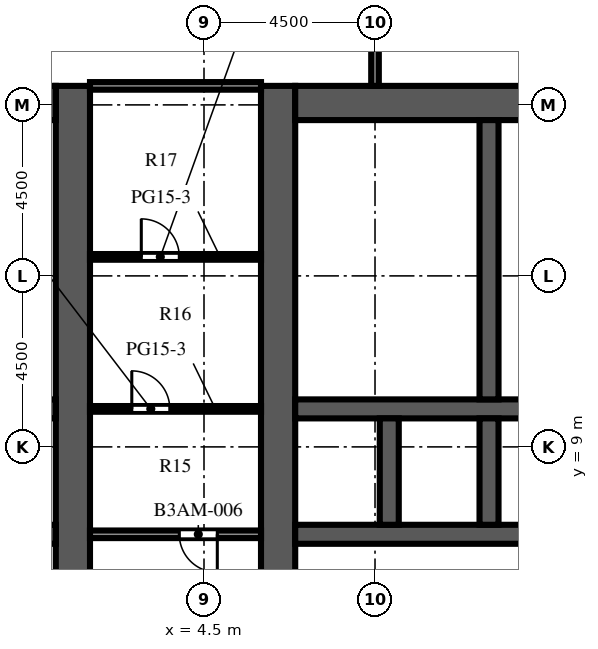
"""IFC4 building model, lengths in metres.
Left out: names, types, materials, properties, quantities, classifications, styles, units other than length and angle.
Written with IfcOpenShell. Run it as: python <this file> out.ifc"""

import sys

from ifc_helpers import new_model, si_unit, direction, frame, frame_2d, origin, place, context, subcontext, project, spatial, rectangle, extrude, element, fill, save


model = new_model("IFC4")
c1 = context("Model", 3, precision=1e-05, world=origin(), true_north=direction((0.0, 1.0)))
c2 = subcontext(c1, "Body", "Model", "MODEL_VIEW")
j1 = project(units=[si_unit("LENGTHUNIT", "METRE"), si_unit("PLANEANGLEUNIT", "RADIAN")], contexts=[c1])
p1 = place(None, origin())
s1 = spatial("IfcSite", under=j1, at=p1, CompositionType="ELEMENT")
p2 = place(p1, origin())
s2 = spatial("IfcBuilding", under=s1, at=p2, CompositionType="ELEMENT")
p3 = place(p2, frame((0.0, 0.0, 110.7)))
s3 = spatial("IfcBuildingStorey", under=s2, at=p3, CompositionType="ELEMENT", Elevation=110.7)
p4 = place(p3, frame((1.05, -9.0, 0.0), z_axis=(0.0, 0.0, 1.0), x_axis=(0.0, 1.0, 0.0)))
e1 = element("IfcWall", 1, at=p4, inside=s3, PredefinedType="SHEAR", context=c2, shape_type="SweptSolid", body=[
    extrude(rectangle(XDim=27.5, YDim=0.9, at=frame_2d((13.75, 0.0))), origin(), (0.0, 0.0, 1.0), 6.0),
])
p5 = place(p4, frame((12.55, 0.0, 0.0)))
e2 = element("IfcOpeningElement", 2, at=p5, cuts=e1, PredefinedType="OPENING", context=c2, shape_type="SweptSolid", body=[
    extrude(rectangle(XDim=2.4, YDim=2.4, at=frame_2d((1.2, 1.2))), frame((0.0, 0.46, 0.0), z_axis=(0.0, -1.0, 0.0), x_axis=(1.0, 0.0, 0.0)), (0.0, 0.0, 1.0), 0.92),
])
p6 = place(p4, frame((3.975, 0.0, 0.0)))
e3 = element("IfcOpeningElement", 3, at=p6, cuts=e1, PredefinedType="OPENING", context=c2, shape_type="SweptSolid", body=[
    extrude(rectangle(XDim=1.2, YDim=2.1, at=frame_2d((0.6, 1.05))), frame((0.0, 0.46, 0.0), z_axis=(0.0, -1.0, 0.0), x_axis=(1.0, 0.0, 0.0)), (0.0, 0.0, 1.0), 0.92),
])
p7 = place(p4, frame((19.485, 0.0, 0.0)))
e4 = element("IfcOpeningElement", 4, at=p7, cuts=e1, PredefinedType="OPENING", context=c2, shape_type="SweptSolid", body=[
    extrude(rectangle(XDim=1.0, YDim=2.1, at=frame_2d((0.5, 1.05))), frame((0.0, 0.46, 0.0), z_axis=(0.0, -1.0, 0.0), x_axis=(1.0, 0.0, 0.0)), (0.0, 0.0, 1.0), 0.92),
])
p8 = place(p4, frame((21.139, 0.0, 0.0)))
e5 = element("IfcOpeningElement", 5, at=p8, cuts=e1, PredefinedType="OPENING", context=c2, shape_type="SweptSolid", body=[
    extrude(rectangle(XDim=1.0, YDim=2.1, at=frame_2d((0.5, 1.05))), frame((0.0, 0.46, 0.0), z_axis=(0.0, -1.0, 0.0), x_axis=(1.0, 0.0, 0.0)), (0.0, 0.0, 1.0), 0.92),
])
p9 = place(p4, frame((23.16, 0.0, 0.0)))
e6 = element("IfcOpeningElement", 6, at=p9, cuts=e1, PredefinedType="OPENING", context=c2, shape_type="SweptSolid", body=[
    extrude(rectangle(XDim=1.0, YDim=2.1, at=frame_2d((0.5, 1.05))), frame((0.0, 0.46, 0.0), z_axis=(0.0, -1.0, 0.0), x_axis=(1.0, 0.0, 0.0)), (0.0, 0.0, 1.0), 0.92),
])
p10 = place(p4, frame((25.181, 0.0, 0.0)))
e7 = element("IfcOpeningElement", 7, at=p10, cuts=e1, PredefinedType="OPENING", context=c2, shape_type="SweptSolid", body=[
    extrude(rectangle(XDim=1.0, YDim=2.1, at=frame_2d((0.5, 1.05))), frame((0.0, 0.46, 0.0), z_axis=(0.0, -1.0, 0.0), x_axis=(1.0, 0.0, 0.0)), (0.0, 0.0, 1.0), 0.92),
])
p11 = place(p3, frame((-9.6, 18.05, 0.0), z_axis=(0.0, 0.0, 1.0), x_axis=(1.0, 0.0, 0.0)))
e8 = element("IfcWall", 8, at=p11, inside=s3, PredefinedType="SHEAR", context=c2, shape_type="SweptSolid", body=[
    extrude(rectangle(XDim=10.2, YDim=0.9, at=frame_2d((5.1, 0.0))), origin(), (0.0, 0.0, 1.0), 6.0),
])
p12 = place(p3, frame((-9.6, 6.7, 0.0), z_axis=(0.0, 0.0, 1.0), x_axis=(1.0, 0.0, 0.0)))
e9 = element("IfcWall", 9, at=p12, inside=s3, PredefinedType="SHEAR", context=c2, shape_type="SweptSolid", body=[
    extrude(rectangle(XDim=10.2, YDim=0.5, at=frame_2d((5.1, 0.0))), origin(), (0.0, 0.0, 1.0), 6.0),
])
p13 = place(p12, frame((0.562, 0.0, 0.0)))
e10 = element("IfcOpeningElement", 10, at=p13, cuts=e9, PredefinedType="OPENING", context=c2, shape_type="SweptSolid", body=[
    extrude(rectangle(XDim=1.1, YDim=2.1, at=frame_2d((0.55, 1.05))), frame((0.0, 0.26, 0.0), z_axis=(0.0, -1.0, 0.0), x_axis=(1.0, 0.0, 0.0)), (0.0, 0.0, 1.0), 0.52),
])
p14 = place(p12, frame((3.288, 0.0, 0.0)))
e11 = element("IfcOpeningElement", 11, at=p14, cuts=e9, PredefinedType="OPENING", context=c2, shape_type="SweptSolid", body=[
    extrude(rectangle(XDim=1.0, YDim=2.1, at=frame_2d((0.5, 1.05))), frame((0.0, 0.26, 0.0), z_axis=(0.0, -1.0, 0.0), x_axis=(1.0, 0.0, 0.0)), (0.0, 0.0, 1.0), 0.52),
])
p15 = place(p12, frame((5.913, 0.0, 0.0)))
e12 = element("IfcOpeningElement", 12, at=p15, cuts=e9, PredefinedType="OPENING", context=c2, shape_type="SweptSolid", body=[
    extrude(rectangle(XDim=1.0, YDim=2.1, at=frame_2d((0.5, 1.05))), frame((0.0, 0.26, 0.0), z_axis=(0.0, -1.0, 0.0), x_axis=(1.0, 0.0, 0.0)), (0.0, 0.0, 1.0), 0.52),
])
p16 = place(p12, frame((8.587, 0.0, 0.0)))
e13 = element("IfcOpeningElement", 13, at=p16, cuts=e9, PredefinedType="OPENING", context=c2, shape_type="SweptSolid", body=[
    extrude(rectangle(XDim=1.0, YDim=2.1, at=frame_2d((0.5, 1.05))), frame((0.0, 0.26, 0.0), z_axis=(0.0, -1.0, 0.0), x_axis=(1.0, 0.0, 0.0)), (0.0, 0.0, 1.0), 0.52),
])
p17 = place(p3, frame((-9.6, 10.0, 0.0), z_axis=(0.0, 0.0, 1.0), x_axis=(1.0, 0.0, 0.0)))
e14 = element("IfcWall", 14, at=p17, inside=s3, PredefinedType="SHEAR", context=c2, shape_type="SweptSolid", body=[
    extrude(rectangle(XDim=10.2, YDim=0.5, at=frame_2d((5.1, 0.0))), origin(), (0.0, 0.0, 1.0), 6.0),
])
p18 = place(p3, frame((6.45, -9.0, 0.0), z_axis=(0.0, 0.0, 1.0), x_axis=(0.0, 1.0, 0.0)))
e15 = element("IfcWall", 15, at=p18, inside=s3, PredefinedType="SHEAR", context=c2, shape_type="SweptSolid", body=[
    extrude(rectangle(XDim=27.5, YDim=0.9, at=frame_2d((13.75, 0.0))), origin(), (0.0, 0.0, 1.0), 6.0),
])
p19 = place(p18, frame((12.55, 0.0, 0.0)))
e16 = element("IfcOpeningElement", 16, at=p19, cuts=e15, PredefinedType="OPENING", context=c2, shape_type="SweptSolid", body=[
    extrude(rectangle(XDim=2.4, YDim=2.4, at=frame_2d((1.2, 1.2))), frame((0.0, 0.46, 0.0), z_axis=(0.0, -1.0, 0.0), x_axis=(1.0, 0.0, 0.0)), (0.0, 0.0, 1.0), 0.92),
])
p20 = place(p18, frame((3.975, 0.0, 0.0)))
e17 = element("IfcOpeningElement", 17, at=p20, cuts=e15, PredefinedType="OPENING", context=c2, shape_type="SweptSolid", body=[
    extrude(rectangle(XDim=1.2, YDim=2.1, at=frame_2d((0.6, 1.05))), frame((0.0, 0.46, 0.0), z_axis=(0.0, -1.0, 0.0), x_axis=(1.0, 0.0, 0.0)), (0.0, 0.0, 1.0), 0.92),
])
p21 = place(p18, frame((19.485, 0.0, 0.0)))
e18 = element("IfcOpeningElement", 18, at=p21, cuts=e15, PredefinedType="OPENING", context=c2, shape_type="SweptSolid", body=[
    extrude(rectangle(XDim=1.0, YDim=2.1, at=frame_2d((0.5, 1.05))), frame((0.0, 0.46, 0.0), z_axis=(0.0, -1.0, 0.0), x_axis=(1.0, 0.0, 0.0)), (0.0, 0.0, 1.0), 0.92),
])
p22 = place(p18, frame((21.139, 0.0, 0.0)))
e19 = element("IfcOpeningElement", 19, at=p22, cuts=e15, PredefinedType="OPENING", context=c2, shape_type="SweptSolid", body=[
    extrude(rectangle(XDim=1.0, YDim=2.1, at=frame_2d((0.5, 1.05))), frame((0.0, 0.46, 0.0), z_axis=(0.0, -1.0, 0.0), x_axis=(1.0, 0.0, 0.0)), (0.0, 0.0, 1.0), 0.92),
])
p23 = place(p18, frame((23.16, 0.0, 0.0)))
e20 = element("IfcOpeningElement", 20, at=p23, cuts=e15, PredefinedType="OPENING", context=c2, shape_type="SweptSolid", body=[
    extrude(rectangle(XDim=1.0, YDim=2.1, at=frame_2d((0.5, 1.05))), frame((0.0, 0.46, 0.0), z_axis=(0.0, -1.0, 0.0), x_axis=(1.0, 0.0, 0.0)), (0.0, 0.0, 1.0), 0.92),
])
p24 = place(p18, frame((25.181, 0.0, 0.0)))
e21 = element("IfcOpeningElement", 21, at=p24, cuts=e15, PredefinedType="OPENING", context=c2, shape_type="SweptSolid", body=[
    extrude(rectangle(XDim=1.0, YDim=2.1, at=frame_2d((0.5, 1.05))), frame((0.0, 0.46, 0.0), z_axis=(0.0, -1.0, 0.0), x_axis=(1.0, 0.0, 0.0)), (0.0, 0.0, 1.0), 0.92),
])
p25 = place(p3, frame((6.9, 18.05, 0.0), z_axis=(0.0, 0.0, 1.0), x_axis=(1.0, 0.0, 0.0)))
e22 = element("IfcWall", 22, at=p25, inside=s3, PredefinedType="SHEAR", context=c2, shape_type="SweptSolid", body=[
    extrude(rectangle(XDim=10.2, YDim=0.9, at=frame_2d((5.1, 0.0))), origin(), (0.0, 0.0, 1.0), 6.0),
])
p26 = place(p3, frame((6.9, 6.7, 0.0), z_axis=(0.0, 0.0, 1.0), x_axis=(1.0, 0.0, 0.0)))
e23 = element("IfcWall", 23, at=p26, inside=s3, PredefinedType="SHEAR", context=c2, shape_type="SweptSolid", body=[
    extrude(rectangle(XDim=10.2, YDim=0.5, at=frame_2d((5.1, 0.0))), origin(), (0.0, 0.0, 1.0), 6.0),
])
p27 = place(p26, frame((0.562, 0.0, 0.0)))
e24 = element("IfcOpeningElement", 24, at=p27, cuts=e23, PredefinedType="OPENING", context=c2, shape_type="SweptSolid", body=[
    extrude(rectangle(XDim=1.1, YDim=2.1, at=frame_2d((0.55, 1.05))), frame((0.0, 0.26, 0.0), z_axis=(0.0, -1.0, 0.0), x_axis=(1.0, 0.0, 0.0)), (0.0, 0.0, 1.0), 0.52),
])
p28 = place(p26, frame((3.288, 0.0, 0.0)))
e25 = element("IfcOpeningElement", 25, at=p28, cuts=e23, PredefinedType="OPENING", context=c2, shape_type="SweptSolid", body=[
    extrude(rectangle(XDim=1.0, YDim=2.1, at=frame_2d((0.5, 1.05))), frame((0.0, 0.26, 0.0), z_axis=(0.0, -1.0, 0.0), x_axis=(1.0, 0.0, 0.0)), (0.0, 0.0, 1.0), 0.52),
])
p29 = place(p26, frame((5.913, 0.0, 0.0)))
e26 = element("IfcOpeningElement", 26, at=p29, cuts=e23, PredefinedType="OPENING", context=c2, shape_type="SweptSolid", body=[
    extrude(rectangle(XDim=1.0, YDim=2.1, at=frame_2d((0.5, 1.05))), frame((0.0, 0.26, 0.0), z_axis=(0.0, -1.0, 0.0), x_axis=(1.0, 0.0, 0.0)), (0.0, 0.0, 1.0), 0.52),
])
p30 = place(p26, frame((8.587, 0.0, 0.0)))
e27 = element("IfcOpeningElement", 27, at=p30, cuts=e23, PredefinedType="OPENING", context=c2, shape_type="SweptSolid", body=[
    extrude(rectangle(XDim=1.0, YDim=2.1, at=frame_2d((0.5, 1.05))), frame((0.0, 0.26, 0.0), z_axis=(0.0, -1.0, 0.0), x_axis=(1.0, 0.0, 0.0)), (0.0, 0.0, 1.0), 0.52),
])
p31 = place(p3, frame((6.9, 10.0, 0.0), z_axis=(0.0, 0.0, 1.0), x_axis=(1.0, 0.0, 0.0)))
e28 = element("IfcWall", 28, at=p31, inside=s3, PredefinedType="SHEAR", context=c2, shape_type="SweptSolid", body=[
    extrude(rectangle(XDim=10.2, YDim=0.5, at=frame_2d((5.1, 0.0))), origin(), (0.0, 0.0, 1.0), 6.0),
])
for number, where, z_axis, x_axis in (
    (29, (9.375, 6.95, 0.0), (0.0, 0.0, 1.0), (0.0, 1.0, 0.0)),
    (30, (12.0, 6.95, 0.0), (0.0, 0.0, 1.0), (0.0, 1.0, 0.0)),
):
    element("IfcWall", number, at=place(p3, frame(where, z_axis=z_axis, x_axis=x_axis)), inside=s3, PredefinedType="SHEAR", context=c2, shape_type="SweptSolid", body=[
        extrude(rectangle(XDim=2.8, YDim=0.5, at=frame_2d((1.4, 0.0))), origin(), (0.0, 0.0, 1.0), 6.0),
    ])
p32 = place(p3, frame((12.0, 10.25, 0.0), z_axis=(0.0, 0.0, 1.0), x_axis=(0.0, 1.0, 0.0)))
e31 = element("IfcWall", 31, at=p32, inside=s3, PredefinedType="SHEAR", context=c2, shape_type="SweptSolid", body=[
    extrude(rectangle(XDim=7.35, YDim=0.5, at=frame_2d((3.675, 0.0))), origin(), (0.0, 0.0, 1.0), 6.0),
])
for number, where, z_axis, x_axis in (
    (32, (-4.25, 11.72, 0.0), (0.0, 0.0, 1.0), (1.0, 0.0, 0.0)),
    (33, (-4.25, 13.558, 0.0), (0.0, 0.0, 1.0), (1.0, 0.0, 0.0)),
    (34, (-4.25, 15.762, 0.0), (0.0, 0.0, 1.0), (1.0, 0.0, 0.0)),
    (35, (6.9, 11.72, 0.0), (0.0, 0.0, 1.0), (1.0, 0.0, 0.0)),
    (36, (6.9, 13.558, 0.0), (0.0, 0.0, 1.0), (1.0, 0.0, 0.0)),
    (37, (6.9, 15.762, 0.0), (0.0, 0.0, 1.0), (1.0, 0.0, 0.0)),
):
    element("IfcWall", number, at=place(p3, frame(where, z_axis=z_axis, x_axis=x_axis)), inside=s3, PredefinedType="PARTITIONING", context=c2, shape_type="SweptSolid", body=[
        extrude(rectangle(XDim=4.85, YDim=0.1, at=frame_2d((2.425, 0.0))), origin(), (0.0, 0.0, 1.0), 5.55),
    ])
p33 = place(p3, frame((9.0, 18.5, 0.0), z_axis=(0.0, 0.0, 1.0), x_axis=(0.0, 1.0, 0.0)))
e38 = element("IfcWall", 38, at=p33, inside=s3, PredefinedType="PARTITIONING", context=c2, shape_type="SweptSolid", body=[
    extrude(rectangle(XDim=3.3, YDim=0.2, at=frame_2d((1.65, 0.0))), origin(), (0.0, 0.0, 1.0), 5.55),
])
p34 = place(p3, frame((1.5, 6.7, 0.0), z_axis=(0.0, 0.0, 1.0), x_axis=(1.0, 0.0, 0.0)))
e39 = element("IfcWall", 39, at=p34, inside=s3, PredefinedType="PARTITIONING", context=c2, shape_type="SweptSolid", body=[
    extrude(rectangle(XDim=4.5, YDim=0.2, at=frame_2d((2.25, 0.0))), origin(), (0.0, 0.0, 1.0), 5.55),
])
p35 = place(p34, frame((2.35, 0.0, 0.0)))
e40 = element("IfcOpeningElement", 40, at=p35, cuts=e39, PredefinedType="OPENING", context=c2, shape_type="SweptSolid", body=[
    extrude(rectangle(XDim=1.0, YDim=2.1, at=frame_2d((0.5, 1.05))), frame((0.0, 0.11, 0.0), z_axis=(0.0, -1.0, 0.0), x_axis=(1.0, 0.0, 0.0)), (0.0, 0.0, 1.0), 0.22),
])
p36 = place(p3, frame((1.5, 10.0, 0.0), z_axis=(0.0, 0.0, 1.0), x_axis=(1.0, 0.0, 0.0)))
e41 = element("IfcWall", 41, at=p36, inside=s3, PredefinedType="PARTITIONING", context=c2, shape_type="SweptSolid", body=[
    extrude(rectangle(XDim=4.5, YDim=0.15, at=frame_2d((2.25, 0.0))), origin(), (0.0, 0.0, 1.0), 5.55),
])
p37 = place(p36, frame((1.1, 0.0, 0.0)))
e42 = element("IfcOpeningElement", 42, at=p37, cuts=e41, PredefinedType="OPENING", context=c2, shape_type="SweptSolid", body=[
    extrude(rectangle(XDim=1.0, YDim=2.1, at=frame_2d((0.5, 1.05))), frame((0.0, 0.085, 0.0), z_axis=(0.0, -1.0, 0.0), x_axis=(1.0, 0.0, 0.0)), (0.0, 0.0, 1.0), 0.17),
])
p38 = place(p3, frame((1.5, 14.0, 0.0), z_axis=(0.0, 0.0, 1.0), x_axis=(1.0, 0.0, 0.0)))
e43 = element("IfcWall", 43, at=p38, inside=s3, PredefinedType="PARTITIONING", context=c2, shape_type="SweptSolid", body=[
    extrude(rectangle(XDim=4.5, YDim=0.15, at=frame_2d((2.25, 0.0))), origin(), (0.0, 0.0, 1.0), 5.55),
])
p39 = place(p38, frame((1.35, 0.0, 0.0)))
e44 = element("IfcOpeningElement", 44, at=p39, cuts=e43, PredefinedType="OPENING", context=c2, shape_type="SweptSolid", body=[
    extrude(rectangle(XDim=1.0, YDim=2.1, at=frame_2d((0.5, 1.05))), frame((0.0, 0.085, 0.0), z_axis=(0.0, -1.0, 0.0), x_axis=(1.0, 0.0, 0.0)), (0.0, 0.0, 1.0), 0.17),
])
p40 = place(p3, frame((1.5, 18.5, 0.0), z_axis=(0.0, 0.0, 1.0), x_axis=(1.0, 0.0, 0.0)))
e45 = element("IfcWall", 45, at=p40, inside=s3, PredefinedType="PARTITIONING", context=c2, shape_type="SweptSolid", body=[
    extrude(rectangle(XDim=4.5, YDim=0.2, at=frame_2d((2.25, 0.0))), origin(), (0.0, 0.0, 1.0), 5.55),
])
p41 = place(p27, origin())
e46 = element("IfcDoor", 46, at=p41, inside=s3, OperationType="DOUBLE_DOOR_SLIDING", PredefinedType="DOOR", context=c2, shape_type="SweptSolid", body=[
    extrude(rectangle(XDim=1.1, YDim=2.1, at=frame_2d((0.55, 1.05))), frame((0.0, 0.025, 0.0), z_axis=(0.0, -1.0, 0.0), x_axis=(1.0, 0.0, 0.0)), (0.0, 0.0, 1.0), 0.05),
])
fill(e24, e46)
p42 = place(p5, origin())
e47 = element("IfcDoor", 47, at=p42, inside=s3, OperationType="DOUBLE_DOOR_DOUBLE_SWING", PredefinedType="DOOR", context=c2, shape_type="SweptSolid", body=[
    extrude(rectangle(XDim=2.4, YDim=2.4, at=frame_2d((1.2, 1.2))), frame((0.0, 0.025, 0.0), z_axis=(0.0, -1.0, 0.0), x_axis=(1.0, 0.0, 0.0)), (0.0, 0.0, 1.0), 0.05),
])
fill(e2, e47)
p43 = place(p19, origin())
e48 = element("IfcDoor", 48, at=p43, inside=s3, OperationType="DOUBLE_DOOR_DOUBLE_SWING", PredefinedType="DOOR", context=c2, shape_type="SweptSolid", body=[
    extrude(rectangle(XDim=2.4, YDim=2.4, at=frame_2d((1.2, 1.2))), frame((0.0, 0.025, 0.0), z_axis=(0.0, -1.0, 0.0), x_axis=(1.0, 0.0, 0.0)), (0.0, 0.0, 1.0), 0.05),
])
fill(e16, e48)
p44 = place(p7, origin())
e49 = element("IfcDoor", 49, at=p44, inside=s3, OperationType="SINGLE_SWING_LEFT", PredefinedType="DOOR", context=c2, shape_type="SweptSolid", body=[
    extrude(rectangle(XDim=1.0, YDim=2.1, at=frame_2d((0.5, 1.05))), frame((0.0, 0.425, 0.0), z_axis=(0.0, -1.0, 0.0), x_axis=(1.0, 0.0, 0.0)), (0.0, 0.0, 1.0), 0.05),
])
fill(e4, e49)
p45 = place(p8, origin())
e50 = element("IfcDoor", 50, at=p45, inside=s3, OperationType="SINGLE_SWING_RIGHT", PredefinedType="DOOR", context=c2, shape_type="SweptSolid", body=[
    extrude(rectangle(XDim=1.0, YDim=2.1, at=frame_2d((0.5, 1.05))), frame((0.0, 0.425, 0.0), z_axis=(0.0, -1.0, 0.0), x_axis=(1.0, 0.0, 0.0)), (0.0, 0.0, 1.0), 0.05),
])
fill(e5, e50)
p46 = place(p9, origin())
e51 = element("IfcDoor", 51, at=p46, inside=s3, OperationType="SINGLE_SWING_LEFT", PredefinedType="DOOR", context=c2, shape_type="SweptSolid", body=[
    extrude(rectangle(XDim=1.0, YDim=2.1, at=frame_2d((0.5, 1.05))), frame((0.0, 0.425, 0.0), z_axis=(0.0, -1.0, 0.0), x_axis=(1.0, 0.0, 0.0)), (0.0, 0.0, 1.0), 0.05),
])
fill(e6, e51)
p47 = place(p10, origin())
e52 = element("IfcDoor", 52, at=p47, inside=s3, OperationType="SINGLE_SWING_RIGHT", PredefinedType="DOOR", context=c2, shape_type="SweptSolid", body=[
    extrude(rectangle(XDim=1.0, YDim=2.1, at=frame_2d((0.5, 1.05))), frame((0.0, 0.425, 0.0), z_axis=(0.0, -1.0, 0.0), x_axis=(1.0, 0.0, 0.0)), (0.0, 0.0, 1.0), 0.05),
])
fill(e7, e52)
p48 = place(p28, origin())
e53 = element("IfcDoor", 53, at=p48, inside=s3, OperationType="SINGLE_SWING_RIGHT", PredefinedType="DOOR", context=c2, shape_type="SweptSolid", body=[
    extrude(rectangle(XDim=1.0, YDim=2.1, at=frame_2d((0.5, 1.05))), frame((0.0, 0.025, 0.0), z_axis=(0.0, -1.0, 0.0), x_axis=(1.0, 0.0, 0.0)), (0.0, 0.0, 1.0), 0.05),
])
fill(e25, e53)
p49 = place(p21, origin())
e54 = element("IfcDoor", 54, at=p49, inside=s3, OperationType="SINGLE_SWING_RIGHT", PredefinedType="DOOR", context=c2, shape_type="SweptSolid", body=[
    extrude(rectangle(XDim=1.0, YDim=2.1, at=frame_2d((0.5, 1.05))), frame((0.0, -0.375, 0.0), z_axis=(0.0, -1.0, 0.0), x_axis=(1.0, 0.0, 0.0)), (0.0, 0.0, 1.0), 0.05),
])
fill(e18, e54)
p50 = place(p22, origin())
e55 = element("IfcDoor", 55, at=p50, inside=s3, OperationType="SINGLE_SWING_LEFT", PredefinedType="DOOR", context=c2, shape_type="SweptSolid", body=[
    extrude(rectangle(XDim=1.0, YDim=2.1, at=frame_2d((0.5, 1.05))), frame((0.0, -0.375, 0.0), z_axis=(0.0, -1.0, 0.0), x_axis=(1.0, 0.0, 0.0)), (0.0, 0.0, 1.0), 0.05),
])
fill(e19, e55)
p51 = place(p23, origin())
e56 = element("IfcDoor", 56, at=p51, inside=s3, OperationType="SINGLE_SWING_RIGHT", PredefinedType="DOOR", context=c2, shape_type="SweptSolid", body=[
    extrude(rectangle(XDim=1.0, YDim=2.1, at=frame_2d((0.5, 1.05))), frame((0.0, -0.375, 0.0), z_axis=(0.0, -1.0, 0.0), x_axis=(1.0, 0.0, 0.0)), (0.0, 0.0, 1.0), 0.05),
])
fill(e20, e56)
p52 = place(p24, origin())
e57 = element("IfcDoor", 57, at=p52, inside=s3, OperationType="SINGLE_SWING_LEFT", PredefinedType="DOOR", context=c2, shape_type="SweptSolid", body=[
    extrude(rectangle(XDim=1.0, YDim=2.1, at=frame_2d((0.5, 1.05))), frame((0.0, -0.375, 0.0), z_axis=(0.0, -1.0, 0.0), x_axis=(1.0, 0.0, 0.0)), (0.0, 0.0, 1.0), 0.05),
])
fill(e21, e57)
p53 = place(p35, origin())
e58 = element("IfcDoor", 58, at=p53, inside=s3, OperationType="SINGLE_SWING_RIGHT", PredefinedType="DOOR", context=c2, shape_type="SweptSolid", body=[
    extrude(rectangle(XDim=1.0, YDim=2.1, at=frame_2d((0.5, 1.05))), frame((0.0, 0.025, 0.0), z_axis=(0.0, -1.0, 0.0), x_axis=(1.0, 0.0, 0.0)), (0.0, 0.0, 1.0), 0.05),
])
fill(e40, e58)
p54 = place(p37, origin())
e59 = element("IfcDoor", 59, at=p54, inside=s3, OperationType="SINGLE_SWING_LEFT", PredefinedType="DOOR", context=c2, shape_type="SweptSolid", body=[
    extrude(rectangle(XDim=1.0, YDim=2.1, at=frame_2d((0.5, 1.05))), frame((0.0, 0.025, 0.0), z_axis=(0.0, -1.0, 0.0), x_axis=(1.0, 0.0, 0.0)), (0.0, 0.0, 1.0), 0.05),
])
fill(e42, e59)
p55 = place(p39, origin())
e60 = element("IfcDoor", 60, at=p55, inside=s3, OperationType="SINGLE_SWING_LEFT", PredefinedType="DOOR", context=c2, shape_type="SweptSolid", body=[
    extrude(rectangle(XDim=1.0, YDim=2.1, at=frame_2d((0.5, 1.05))), frame((0.0, 0.025, 0.0), z_axis=(0.0, -1.0, 0.0), x_axis=(1.0, 0.0, 0.0)), (0.0, 0.0, 1.0), 0.05),
])
fill(e44, e60)
save(model, sys.argv[1])
